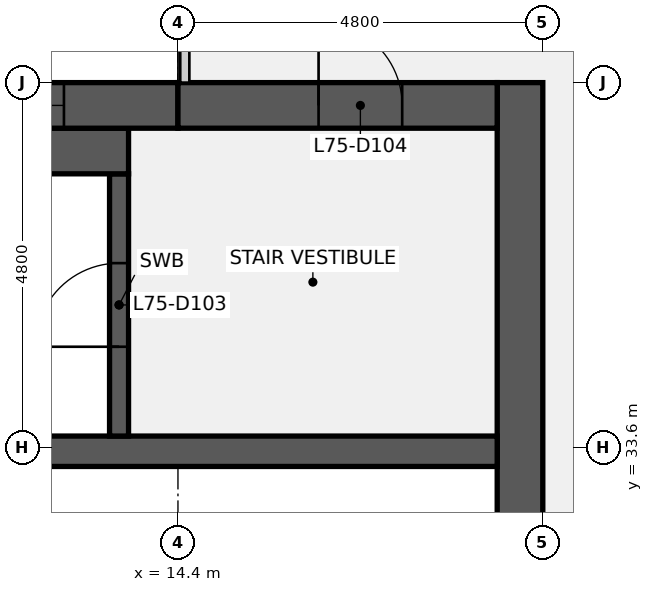
"""IFC4 building model, lengths in metres.
Left out: names, types, materials, properties, quantities, classifications, styles, units other than length and angle.
Written with IfcOpenShell. Run it as: python <this file> out.ifc"""

import sys

from ifc_helpers import new_model, si_unit, direction, frame, frame_2d, origin, place, context, subcontext, project, spatial, rectangle, extrude, element, fill, save


model = new_model("IFC4")
c1 = context("Model", 3, precision=1e-05, world=origin(), true_north=direction((0.0, 1.0)))
c2 = subcontext(c1, "Body", "Model", "MODEL_VIEW")
j1 = project(units=[si_unit("LENGTHUNIT", "METRE"), si_unit("PLANEANGLEUNIT", "RADIAN")], contexts=[c1])
p1 = place(None, origin())
s1 = spatial("IfcSite", under=j1, at=p1, CompositionType="ELEMENT")
p2 = place(p1, origin())
s2 = spatial("IfcBuilding", under=s1, at=p2, CompositionType="ELEMENT")
p3 = place(p2, frame((0.0, 0.0, 338.3)))
s3 = spatial("IfcBuildingStorey", under=s2, at=p3, CompositionType="ELEMENT", Elevation=338.3)
p4 = place(p3, frame((18.9, 38.4, 0.0), z_axis=(0.0, 0.0, 1.0), x_axis=(0.0, -1.0, 0.0)))
e1 = element("IfcWall", 1, at=p4, inside=s3, PredefinedType="SHEAR", context=c2, shape_type="SweptSolid", body=[
    extrude(rectangle(XDim=28.8, YDim=0.6, at=frame_2d((14.4, 0.0))), origin(), (0.0, 0.0, 1.0), 3.84),
])
p5 = place(p4, frame((18.3, 0.0, 0.0)))
e2 = element("IfcOpeningElement", 2, at=p5, cuts=e1, PredefinedType="OPENING", context=c2, shape_type="SweptSolid", body=[
    extrude(rectangle(XDim=1.8, YDim=2.1, at=frame_2d((0.9, 1.05))), frame((0.0, 0.31, 0.0), z_axis=(0.0, -1.0, 0.0), x_axis=(1.0, 0.0, 0.0)), (0.0, 0.0, 1.0), 0.62),
])
p6 = place(p4, frame((8.7, 0.0, 0.0)))
e3 = element("IfcOpeningElement", 3, at=p6, cuts=e1, PredefinedType="OPENING", context=c2, shape_type="SweptSolid", body=[
    extrude(rectangle(XDim=1.8, YDim=2.1, at=frame_2d((0.9, 1.05))), frame((0.0, 0.31, 0.0), z_axis=(0.0, -1.0, 0.0), x_axis=(1.0, 0.0, 0.0)), (0.0, 0.0, 1.0), 0.62),
])
p7 = place(p3, frame((0.6, 33.55, 0.0), z_axis=(0.0, 0.0, 1.0), x_axis=(1.0, 0.0, 0.0)))
e4 = element("IfcWall", 4, at=p7, inside=s3, PredefinedType="SHEAR", context=c2, shape_type="SweptSolid", body=[
    extrude(rectangle(XDim=18.0, YDim=0.4, at=frame_2d((9.0, 0.0))), origin(), (0.0, 0.0, 1.0), 3.84),
])
p8 = place(p3, frame((13.625, 33.75, 0.0), z_axis=(0.0, 0.0, 1.0), x_axis=(0.0, 1.0, 0.0)))
e5 = element("IfcWall", 5, at=p8, inside=s3, PredefinedType="SHEAR", context=c2, shape_type="SweptSolid", body=[
    extrude(rectangle(XDim=3.45, YDim=0.25, at=frame_2d((1.725, 0.0))), origin(), (0.0, 0.0, 1.0), 3.84),
])
p9 = place(p8, frame((1.175, 0.0, 0.0)))
e6 = element("IfcOpeningElement", 6, at=p9, cuts=e5, PredefinedType="OPENING", context=c2, shape_type="SweptSolid", body=[
    extrude(rectangle(XDim=1.1, YDim=2.1, at=frame_2d((0.55, 1.05))), frame((0.0, 0.135, 0.0), z_axis=(0.0, -1.0, 0.0), x_axis=(1.0, 0.0, 0.0)), (0.0, 0.0, 1.0), 0.27),
])
p10 = place(p3, frame((6.25, 37.5, 0.0), z_axis=(0.0, 0.0, 1.0), x_axis=(1.0, 0.0, 0.0)))
e7 = element("IfcWall", 7, at=p10, inside=s3, PredefinedType="SHEAR", context=c2, shape_type="SweptSolid", body=[
    extrude(rectangle(XDim=7.5, YDim=0.6, at=frame_2d((3.75, 0.0))), origin(), (0.0, 0.0, 1.0), 3.84),
])
p11 = place(p3, frame((0.6, 38.1, 0.0), z_axis=(0.0, 0.0, 1.0), x_axis=(1.0, 0.0, 0.0)))
e8 = element("IfcWall", 8, at=p11, inside=s3, PredefinedType="SHEAR", context=c2, shape_type="SweptSolid", body=[
    extrude(rectangle(XDim=13.8, YDim=0.6, at=frame_2d((6.9, 0.0))), origin(), (0.0, 0.0, 1.0), 3.84),
])
p12 = place(p11, frame((5.7, 0.0, 0.9)))
e9 = element("IfcOpeningElement", 9, at=p12, cuts=e8, PredefinedType="OPENING", context=c2, shape_type="SweptSolid", body=[
    extrude(rectangle(XDim=1.8, YDim=1.5, at=frame_2d((0.9, 0.75))), frame((0.0, 0.31, 0.0), z_axis=(0.0, -1.0, 0.0), x_axis=(1.0, 0.0, 0.0)), (0.0, 0.0, 1.0), 0.62),
])
p13 = place(p11, frame((10.5, 0.0, 0.9)))
e10 = element("IfcOpeningElement", 10, at=p13, cuts=e8, PredefinedType="OPENING", context=c2, shape_type="SweptSolid", body=[
    extrude(rectangle(XDim=1.8, YDim=1.5, at=frame_2d((0.9, 0.75))), frame((0.0, 0.31, 0.0), z_axis=(0.0, -1.0, 0.0), x_axis=(1.0, 0.0, 0.0)), (0.0, 0.0, 1.0), 0.62),
])
p14 = place(p3, frame((14.4, 38.1, 0.0), z_axis=(0.0, 0.0, 1.0), x_axis=(1.0, 0.0, 0.0)))
e11 = element("IfcWall", 11, at=p14, inside=s3, PredefinedType="SHEAR", context=c2, shape_type="SweptSolid", body=[
    extrude(rectangle(XDim=4.2, YDim=0.6, at=frame_2d((2.1, 0.0))), origin(), (0.0, 0.0, 1.0), 3.84),
])
p15 = place(p14, frame((1.85, 0.0, 0.0)))
e12 = element("IfcOpeningElement", 12, at=p15, cuts=e11, PredefinedType="OPENING", context=c2, shape_type="SweptSolid", body=[
    extrude(rectangle(XDim=1.1, YDim=2.1, at=frame_2d((0.55, 1.05))), frame((0.0, 0.31, 0.0), z_axis=(0.0, -1.0, 0.0), x_axis=(1.0, 0.0, 0.0)), (0.0, 0.0, 1.0), 0.62),
])
p16 = place(p9, origin())
e13 = element("IfcDoor", 13, at=p16, inside=s3, OperationType="SINGLE_SWING_LEFT", PredefinedType="DOOR", context=c2, shape_type="SweptSolid", body=[
    extrude(rectangle(XDim=1.1, YDim=2.1, at=frame_2d((0.55, 1.05))), frame((0.0, 0.025, 0.0), z_axis=(0.0, -1.0, 0.0), x_axis=(1.0, 0.0, 0.0)), (0.0, 0.0, 1.0), 0.05),
])
fill(e6, e13)
p17 = place(p15, origin())
e14 = element("IfcDoor", 14, at=p17, inside=s3, OperationType="SINGLE_SWING_LEFT", PredefinedType="DOOR", context=c2, shape_type="SweptSolid", body=[
    extrude(rectangle(XDim=1.1, YDim=2.1, at=frame_2d((0.55, 1.05))), frame((0.0, 0.025, 0.0), z_axis=(0.0, -1.0, 0.0), x_axis=(1.0, 0.0, 0.0)), (0.0, 0.0, 1.0), 0.05),
])
fill(e12, e14)
p18 = place(p13, origin())
e15 = element("IfcWindow", 15, at=p18, inside=s3, PartitioningType="SINGLE_PANEL", PredefinedType="WINDOW", context=c2, shape_type="SweptSolid", body=[
    extrude(rectangle(XDim=1.8, YDim=1.5, at=frame_2d((0.9, 0.75))), frame((0.0, 0.03, 0.0), z_axis=(0.0, -1.0, 0.0), x_axis=(1.0, 0.0, 0.0)), (0.0, 0.0, 1.0), 0.06),
])
fill(e10, e15)
save(model, sys.argv[1])
